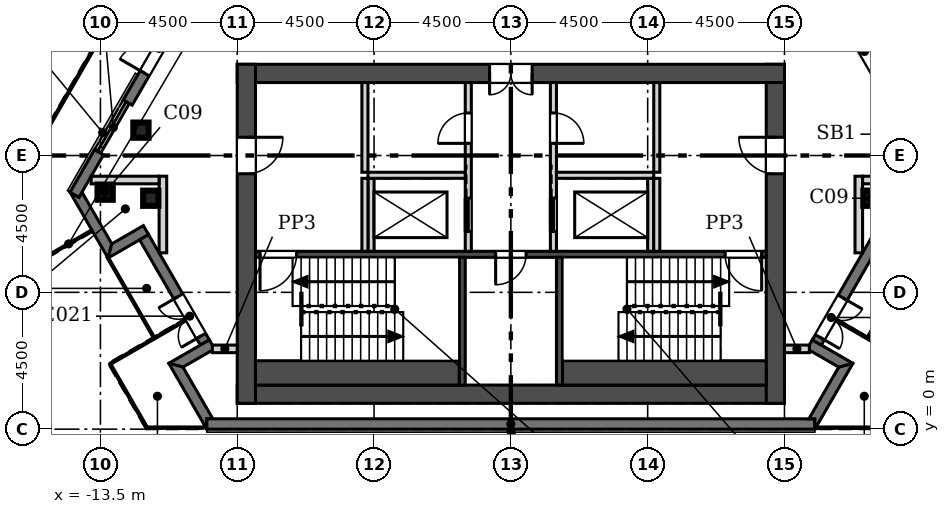
"""IFC4 building model, lengths in metres.
Left out: names, types, materials, properties, quantities, classifications, styles, units other than length and angle.
Written with IfcOpenShell. Run it as: python <this file> out.ifc"""

import sys

from ifc_helpers import new_model, si_unit, direction, frame, frame_2d, origin, origin_2d, place, context, subcontext, project, spatial, polyline, rectangle, hollow_rectangle, outline, extrude, element, fill, save


model = new_model("IFC4")
c1 = context("Model", 3, precision=1e-05, world=origin(), true_north=direction((0.0, 1.0)))
c2 = subcontext(c1, "Body", "Model", "MODEL_VIEW")
j1 = project(units=[si_unit("LENGTHUNIT", "METRE"), si_unit("PLANEANGLEUNIT", "RADIAN")], contexts=[c1])
p1 = place(None, origin())
s1 = spatial("IfcSite", under=j1, at=p1, CompositionType="ELEMENT")
p2 = place(p1, origin())
s2 = spatial("IfcBuilding", under=s1, at=p2, CompositionType="ELEMENT")
p3 = place(p2, frame((0.0, 0.0, 359.6)))
s3 = spatial("IfcBuildingStorey", under=s2, at=p3, CompositionType="ELEMENT", Elevation=359.6)
for number, where, z_axis, x_axis in (
    (1, (-13.345, 7.794, 0.0), (0.0, 0.0, 1.0), (1.0, 0.0, 0.0)),
    (2, (-11.845, 7.595, 0.0), (0.0, 0.0, 1.0), (1.0, 0.0, 0.0)),
    (3, (11.845, 7.595, 0.0), (0.0, 0.0, 1.0), (1.0, 0.0, 0.0)),
    (4, (-12.167, 9.834, 0.0), (0.0, 0.0, 1.0), (1.0, 0.0, 0.0)),
):
    element("IfcColumn", number, at=place(p3, frame(where, z_axis=z_axis, x_axis=x_axis)), inside=s3, PredefinedType="COLUMN", context=c2, shape_type="SweptSolid", body=[
        extrude(hollow_rectangle(XDim=0.5, YDim=0.5, WallThickness=0.025, at=origin_2d()), origin(), (0.0, 0.0, 1.0), 3.6),
    ])
p4 = place(p3, frame((-9.0, 1.15, 0.0), z_axis=(0.0, 0.0, 1.0), x_axis=(1.0, 0.0, 0.0)))
e5 = element("IfcWall", 5, at=p4, inside=s3, PredefinedType="SHEAR", context=c2, shape_type="SweptSolid", body=[
    extrude(rectangle(XDim=18.0, YDim=0.6, at=frame_2d((9.0, 0.0))), origin(), (0.0, 0.0, 1.0), 3.6),
])
p5 = place(p3, frame((8.7, 0.85, 0.0), z_axis=(0.0, 0.0, 1.0), x_axis=(0.0, 1.0, 0.0)))
e6 = element("IfcWall", 6, at=p5, inside=s3, PredefinedType="SHEAR", context=c2, shape_type="SweptSolid", body=[
    extrude(rectangle(XDim=11.15, YDim=0.6, at=frame_2d((5.575, 0.0))), origin(), (0.0, 0.0, 1.0), 3.6),
])
p6 = place(p5, frame((7.55, 0.0, 0.0)))
e7 = element("IfcOpeningElement", 7, at=p6, cuts=e6, PredefinedType="OPENING", context=c2, shape_type="SweptSolid", body=[
    extrude(rectangle(XDim=1.2, YDim=2.1, at=frame_2d((0.6, 1.05))), frame((0.0, 0.31, 0.0), z_axis=(0.0, -1.0, 0.0), x_axis=(1.0, 0.0, 0.0)), (0.0, 0.0, 1.0), 0.62),
])
p7 = place(p3, frame((9.0, 11.7, 0.0), z_axis=(0.0, 0.0, 1.0), x_axis=(-1.0, 0.0, 0.0)))
e8 = element("IfcWall", 8, at=p7, inside=s3, PredefinedType="SHEAR", context=c2, shape_type="SweptSolid", body=[
    extrude(rectangle(XDim=18.0, YDim=0.6, at=frame_2d((9.0, 0.0))), origin(), (0.0, 0.0, 1.0), 3.6),
])
p8 = place(p7, frame((8.3, 0.0, 0.0)))
e9 = element("IfcOpeningElement", 9, at=p8, cuts=e8, PredefinedType="OPENING", context=c2, shape_type="SweptSolid", body=[
    extrude(rectangle(XDim=1.4, YDim=2.1, at=frame_2d((0.7, 1.05))), frame((0.0, 0.31, 0.0), z_axis=(0.0, -1.0, 0.0), x_axis=(1.0, 0.0, 0.0)), (0.0, 0.0, 1.0), 0.62),
])
p9 = place(p3, frame((-8.7, 12.0, 0.0), z_axis=(0.0, 0.0, 1.0), x_axis=(0.0, -1.0, 0.0)))
e10 = element("IfcWall", 10, at=p9, inside=s3, PredefinedType="SHEAR", context=c2, shape_type="SweptSolid", body=[
    extrude(rectangle(XDim=11.15, YDim=0.6, at=frame_2d((5.575, 0.0))), origin(), (0.0, 0.0, 1.0), 3.6),
])
p10 = place(p9, frame((2.4, 0.0, 0.0)))
e11 = element("IfcOpeningElement", 11, at=p10, cuts=e10, PredefinedType="OPENING", context=c2, shape_type="SweptSolid", body=[
    extrude(rectangle(XDim=1.2, YDim=2.1, at=frame_2d((0.6, 1.05))), frame((0.0, 0.31, 0.0), z_axis=(0.0, -1.0, 0.0), x_axis=(1.0, 0.0, 0.0)), (0.0, 0.0, 1.0), 0.62),
])
p11 = place(p3, origin())
e12 = element("IfcWall", 12, at=p11, inside=s3, PredefinedType="SOLIDWALL", context=c2, shape_type="SweptSolid", body=[
    extrude(outline(polyline([(-13.25, 5.628), (-14.501, 7.795), (-14.501, 7.795), (-14.206, 7.625), (-14.107, 7.795), (-13.125, 6.094), (-13.25, 5.628), (-13.25, 5.628)])), origin(), (0.0, 0.0, 1.0), 3.6),
])
p12 = place(p3, origin())
e13 = element("IfcWall", 13, at=p12, inside=s3, PredefinedType="SOLIDWALL", context=c2, shape_type="SweptSolid", body=[
    extrude(outline(polyline([(-12.086, 6.694), (-11.916, 6.399), (-12.21, 6.229), (-13.25, 5.628), (-13.251, 5.628), (-13.126, 6.094), (-12.086, 6.694)])), origin(), (0.0, 0.0, 1.0), 3.6),
])
p13 = place(p3, frame((-12.063, 6.314, 0.0), z_axis=(0.0, 0.0, 1.0), x_axis=(0.49999894854, -0.866026010844, 0.0)))
e14 = element("IfcWall", 14, at=p13, inside=s3, PredefinedType="SOLIDWALL", context=c2, shape_type="SweptSolid", body=[
    extrude(rectangle(XDim=4.0, YDim=0.34, at=frame_2d((2.0, 0.0))), origin(), (0.0, 0.0, 1.0), 3.6),
])
p14 = place(p13, frame((2.25, 0.0, 0.0)))
e15 = element("IfcOpeningElement", 15, at=p14, cuts=e14, PredefinedType="OPENING", context=c2, shape_type="SweptSolid", body=[
    extrude(rectangle(XDim=1.5, YDim=2.4, at=frame_2d((0.75, 1.2))), frame((0.0, 0.18, 0.0), z_axis=(0.0, -1.0, 0.0), x_axis=(1.0, 0.0, 0.0)), (0.0, 0.0, 1.0), 0.36),
])
p15 = place(p3, origin())
e16 = element("IfcWall", 16, at=p15, inside=s3, PredefinedType="SOLIDWALL", context=c2, shape_type="SweptSolid", body=[
    extrude(outline(polyline([(-11.251, 2.165), (-10.211, 2.766), (-9.916, 2.936), (-9.746, 2.64), (-10.785, 2.04), (-11.251, 2.165), (-11.251, 2.165)])), origin(), (0.0, 0.0, 1.0), 3.6),
])
p16 = place(p3, origin())
e17 = element("IfcWall", 17, at=p16, inside=s3, PredefinedType="SOLIDWALL", context=c2, shape_type="SweptSolid", body=[
    extrude(outline(polyline([(-9.803, 0.339), (-10.0, 0.339), (-10.0, -0.001), (-10.0, -0.001), (-11.251, 2.166), (-11.251, 2.166), (-10.785, 2.041), (-9.803, 0.339)])), origin(), (0.0, 0.0, 1.0), 3.6),
])
p17 = place(p3, frame((-10.0, 0.17, 0.0), z_axis=(0.0, 0.0, 1.0), x_axis=(1.0, 0.0, 0.0)))
e18 = element("IfcWall", 18, at=p17, inside=s3, PredefinedType="SOLIDWALL", context=c2, shape_type="SweptSolid", body=[
    extrude(rectangle(XDim=20.0, YDim=0.34, at=frame_2d((10.0, 0.0))), origin(), (0.0, 0.0, 1.0), 3.6),
])
p18 = place(p3, origin())
e19 = element("IfcWall", 19, at=p18, inside=s3, PredefinedType="SOLIDWALL", context=c2, shape_type="SweptSolid", body=[
    extrude(outline(polyline([(11.251, 2.166), (10.0, -0.001), (10.0, -0.001), (10.0, 0.339), (9.803, 0.339), (10.785, 2.041), (11.251, 2.166), (11.251, 2.166)])), origin(), (0.0, 0.0, 1.0), 3.6),
])
p19 = place(p3, origin())
e20 = element("IfcWall", 20, at=p19, inside=s3, PredefinedType="SOLIDWALL", context=c2, shape_type="SweptSolid", body=[
    extrude(outline(polyline([(9.746, 2.64), (9.916, 2.936), (10.211, 2.766), (11.251, 2.165), (11.251, 2.165), (10.785, 2.04), (9.746, 2.64)])), origin(), (0.0, 0.0, 1.0), 3.6),
])
p20 = place(p3, frame((10.063, 2.85, 0.0), z_axis=(0.0, 0.0, 1.0), x_axis=(0.49999894854, 0.866026010844, 0.0)))
e21 = element("IfcWall", 21, at=p20, inside=s3, PredefinedType="SOLIDWALL", context=c2, shape_type="SweptSolid", body=[
    extrude(rectangle(XDim=4.0, YDim=0.34, at=frame_2d((2.0, 0.0))), origin(), (0.0, 0.0, 1.0), 3.6),
])
p21 = place(p20, frame((0.2, 0.0, 0.0)))
e22 = element("IfcOpeningElement", 22, at=p21, cuts=e21, PredefinedType="OPENING", context=c2, shape_type="SweptSolid", body=[
    extrude(rectangle(XDim=1.5, YDim=2.4, at=frame_2d((0.75, 1.2))), frame((0.0, 0.18, 0.0), z_axis=(0.0, -1.0, 0.0), x_axis=(1.0, 0.0, 0.0)), (0.0, 0.0, 1.0), 0.36),
])
p22 = place(p3, frame((12.66, 10.641, 0.0), z_axis=(0.0, 0.0, 1.0), x_axis=(-0.500018604663, 0.866014662111, 0.0)))
e23 = element("IfcWall", 23, at=p22, inside=s3, PredefinedType="SOLIDWALL", context=c2, shape_type="SweptSolid", body=[
    extrude(rectangle(XDim=4.115, YDim=0.34, at=frame_2d((2.058, 0.0))), origin(), (0.0, 0.0, 1.0), 3.6),
])
p23 = place(p22, frame((1.115, 0.0, 0.0)))
e24 = element("IfcOpeningElement", 24, at=p23, cuts=e23, PredefinedType="OPENING", context=c2, shape_type="SweptSolid", body=[
    extrude(rectangle(XDim=1.885, YDim=2.6, at=frame_2d((0.942, 1.3))), frame((0.0, 0.18, 0.0), z_axis=(0.0, -1.0, 0.0), x_axis=(1.0, 0.0, 0.0)), (0.0, 0.0, 1.0), 0.36),
])
p24 = place(p3, frame((-10.545, 14.304, 0.0), z_axis=(0.0, 0.0, 1.0), x_axis=(-0.500018604663, -0.866014662111, 0.0)))
e25 = element("IfcWall", 25, at=p24, inside=s3, PredefinedType="SOLIDWALL", context=c2, shape_type="SweptSolid", body=[
    extrude(rectangle(XDim=4.115, YDim=0.34, at=frame_2d((2.058, 0.0))), origin(), (0.0, 0.0, 1.0), 3.6),
])
p25 = place(p24, frame((1.115, 0.0, 0.0)))
e26 = element("IfcOpeningElement", 26, at=p25, cuts=e25, PredefinedType="OPENING", context=c2, shape_type="SweptSolid", body=[
    extrude(rectangle(XDim=1.885, YDim=2.6, at=frame_2d((0.942, 1.3))), frame((0.0, 0.18, 0.0), z_axis=(0.0, -1.0, 0.0), x_axis=(1.0, 0.0, 0.0)), (0.0, 0.0, 1.0), 0.36),
])
p26 = place(p3, frame((-13.545, 9.108, 0.0), z_axis=(0.0, 0.0, 1.0), x_axis=(-0.500040847832, -0.866001818993, 0.0)))
e27 = element("IfcWall", 27, at=p26, inside=s3, PredefinedType="SOLIDWALL", context=c2, shape_type="SweptSolid", body=[
    extrude(rectangle(XDim=1.615, YDim=0.34, at=frame_2d((0.808, 0.0))), origin(), (0.0, 0.0, 1.0), 3.6),
])
p27 = place(p3, frame((-8.4, 5.75, -0.6), z_axis=(0.0, 0.0, 1.0), x_axis=(1.0, 0.0, 0.0)))
e28 = element("IfcWall", 28, at=p27, inside=s3, PredefinedType="SOLIDWALL", context=c2, shape_type="SweptSolid", body=[
    extrude(rectangle(XDim=16.8, YDim=0.2, at=frame_2d((8.4, 0.0))), origin(), (0.0, 0.0, 1.0), 4.2),
])
p28 = place(p27, frame((7.9, 0.0, 0.6)))
e29 = element("IfcOpeningElement", 29, at=p28, cuts=e28, PredefinedType="OPENING", context=c2, shape_type="SweptSolid", body=[
    extrude(rectangle(XDim=1.0, YDim=2.1, at=frame_2d((0.5, 1.05))), frame((0.0, 0.11, 0.0), z_axis=(0.0, -1.0, 0.0), x_axis=(1.0, 0.0, 0.0)), (0.0, 0.0, 1.0), 0.22),
])
p29 = place(p27, frame((0.15, 0.0, 0.6)))
e30 = element("IfcOpeningElement", 30, at=p29, cuts=e28, PredefinedType="OPENING", context=c2, shape_type="SweptSolid", body=[
    extrude(rectangle(XDim=1.2, YDim=2.1, at=frame_2d((0.6, 1.05))), frame((0.0, 0.11, 0.0), z_axis=(0.0, -1.0, 0.0), x_axis=(1.0, 0.0, 0.0)), (0.0, 0.0, 1.0), 0.22),
])
p30 = place(p27, frame((15.45, 0.0, 0.6)))
e31 = element("IfcOpeningElement", 31, at=p30, cuts=e28, PredefinedType="OPENING", context=c2, shape_type="SweptSolid", body=[
    extrude(rectangle(XDim=1.2, YDim=2.1, at=frame_2d((0.6, 1.05))), frame((0.0, 0.11, 0.0), z_axis=(0.0, -1.0, 0.0), x_axis=(1.0, 0.0, 0.0)), (0.0, 0.0, 1.0), 0.22),
])
p31 = place(p3, frame((-1.6, 1.45, -0.6), z_axis=(0.0, 0.0, 1.0), x_axis=(0.0, 1.0, 0.0)))
e32 = element("IfcWall", 32, at=p31, inside=s3, PredefinedType="SOLIDWALL", context=c2, shape_type="SweptSolid", body=[
    extrude(rectangle(XDim=4.2, YDim=0.2, at=frame_2d((2.1, 0.0))), origin(), (0.0, 0.0, 1.0), 4.2),
])
p32 = place(p3, frame((-8.4, 1.85, -0.6), z_axis=(0.0, 0.0, 1.0), x_axis=(1.0, 0.0, 0.0)))
e33 = element("IfcWall", 33, at=p32, inside=s3, PredefinedType="SOLIDWALL", context=c2, shape_type="SweptSolid", body=[
    extrude(rectangle(XDim=6.7, YDim=0.8, at=frame_2d((3.35, 0.0))), origin(), (0.0, 0.0, 1.0), 4.2),
])
p33 = place(p3, frame((1.6, 1.45, -0.6), z_axis=(0.0, 0.0, 1.0), x_axis=(0.0, 1.0, 0.0)))
e34 = element("IfcWall", 34, at=p33, inside=s3, PredefinedType="SOLIDWALL", context=c2, shape_type="SweptSolid", body=[
    extrude(rectangle(XDim=4.2, YDim=0.2, at=frame_2d((2.1, 0.0))), origin(), (0.0, 0.0, 1.0), 4.2),
])
p34 = place(p3, frame((1.7, 1.85, -0.6), z_axis=(0.0, 0.0, 1.0), x_axis=(1.0, 0.0, 0.0)))
e35 = element("IfcWall", 35, at=p34, inside=s3, PredefinedType="SOLIDWALL", context=c2, shape_type="SweptSolid", body=[
    extrude(rectangle(XDim=6.7, YDim=0.8, at=frame_2d((3.35, 0.0))), origin(), (0.0, 0.0, 1.0), 4.2),
])
p35 = place(p3, frame((-1.4, 5.85, 0.0), z_axis=(0.0, 0.0, 1.0), x_axis=(0.0, 1.0, 0.0)))
e36 = element("IfcWall", 36, at=p35, inside=s3, PredefinedType="SOLIDWALL", context=c2, shape_type="SweptSolid", body=[
    extrude(rectangle(XDim=5.55, YDim=0.2, at=frame_2d((2.775, 0.0))), origin(), (0.0, 0.0, 1.0), 3.6),
])
p36 = place(p35, frame((0.65, 0.0, 0.0)))
e37 = element("IfcOpeningElement", 37, at=p36, cuts=e36, PredefinedType="OPENING", context=c2, shape_type="SweptSolid", body=[
    extrude(rectangle(XDim=1.1, YDim=2.1, at=frame_2d((0.55, 1.05))), frame((0.0, 0.11, 0.0), z_axis=(0.0, -1.0, 0.0), x_axis=(1.0, 0.0, 0.0)), (0.0, 0.0, 1.0), 0.22),
])
p37 = place(p35, frame((3.55, 0.0, 0.0)))
e38 = element("IfcOpeningElement", 38, at=p37, cuts=e36, PredefinedType="OPENING", context=c2, shape_type="SweptSolid", body=[
    extrude(rectangle(XDim=1.0, YDim=2.1, at=frame_2d((0.5, 1.05))), frame((0.0, 0.11, 0.0), z_axis=(0.0, -1.0, 0.0), x_axis=(1.0, 0.0, 0.0)), (0.0, 0.0, 1.0), 0.22),
])
p38 = place(p3, frame((1.4, 5.85, 0.0), z_axis=(0.0, 0.0, 1.0), x_axis=(0.0, 1.0, 0.0)))
e39 = element("IfcWall", 39, at=p38, inside=s3, PredefinedType="SOLIDWALL", context=c2, shape_type="SweptSolid", body=[
    extrude(rectangle(XDim=5.55, YDim=0.2, at=frame_2d((2.775, 0.0))), origin(), (0.0, 0.0, 1.0), 3.6),
])
p39 = place(p38, frame((0.65, 0.0, 0.0)))
e40 = element("IfcOpeningElement", 40, at=p39, cuts=e39, PredefinedType="OPENING", context=c2, shape_type="SweptSolid", body=[
    extrude(rectangle(XDim=1.1, YDim=2.1, at=frame_2d((0.55, 1.05))), frame((0.0, 0.11, 0.0), z_axis=(0.0, -1.0, 0.0), x_axis=(1.0, 0.0, 0.0)), (0.0, 0.0, 1.0), 0.22),
])
p40 = place(p38, frame((3.55, 0.0, 0.0)))
e41 = element("IfcOpeningElement", 41, at=p40, cuts=e39, PredefinedType="OPENING", context=c2, shape_type="SweptSolid", body=[
    extrude(rectangle(XDim=1.0, YDim=2.1, at=frame_2d((0.5, 1.05))), frame((0.0, 0.11, 0.0), z_axis=(0.0, -1.0, 0.0), x_axis=(1.0, 0.0, 0.0)), (0.0, 0.0, 1.0), 0.22),
])
for number, where, z_axis, x_axis in (
    (42, (-4.6, 5.85, 0.0), (0.0, 0.0, 1.0), (0.0, 1.0, 0.0)),
    (43, (4.6, 5.85, 0.0), (0.0, 0.0, 1.0), (0.0, 1.0, 0.0)),
):
    element("IfcWall", number, at=place(p3, frame(where, z_axis=z_axis, x_axis=x_axis)), inside=s3, PredefinedType="SOLIDWALL", context=c2, shape_type="SweptSolid", body=[
        extrude(rectangle(XDim=2.4, YDim=0.2, at=frame_2d((1.2, 0.0))), origin(), (0.0, 0.0, 1.0), 3.6),
    ])
for number, where, z_axis, x_axis in (
    (44, (-4.7, 8.35, 0.0), (0.0, 0.0, 1.0), (1.0, 0.0, 0.0)),
    (45, (1.5, 8.35, 0.0), (0.0, 0.0, 1.0), (1.0, 0.0, 0.0)),
):
    element("IfcWall", number, at=place(p3, frame(where, z_axis=z_axis, x_axis=x_axis)), inside=s3, PredefinedType="SOLIDWALL", context=c2, shape_type="SweptSolid", body=[
        extrude(rectangle(XDim=3.2, YDim=0.2, at=frame_2d((1.6, 0.0))), origin(), (0.0, 0.0, 1.0), 3.6),
    ])
for number, where, z_axis, x_axis in (
    (46, (-4.8, 8.45, 0.0), (0.0, 0.0, 1.0), (0.0, 1.0, 0.0)),
    (47, (4.8, 8.45, 0.0), (0.0, 0.0, 1.0), (0.0, 1.0, 0.0)),
):
    element("IfcWall", number, at=place(p3, frame(where, z_axis=z_axis, x_axis=x_axis)), inside=s3, PredefinedType="SOLIDWALL", context=c2, shape_type="SweptSolid", body=[
        extrude(rectangle(XDim=2.95, YDim=0.2, at=frame_2d((1.475, 0.0))), origin(), (0.0, 0.0, 1.0), 3.6),
    ])
for number, where, z_axis, x_axis in (
    (48, (-4.8, 5.85, 0.0), (0.0, 0.0, 1.0), (0.0, 1.0, 0.0)),
    (49, (4.8, 5.85, 0.0), (0.0, 0.0, 1.0), (0.0, 1.0, 0.0)),
):
    element("IfcWall", number, at=place(p3, frame(where, z_axis=z_axis, x_axis=x_axis)), inside=s3, PredefinedType="SOLIDWALL", context=c2, shape_type="SweptSolid", body=[
        extrude(rectangle(XDim=2.4, YDim=0.2, at=frame_2d((1.2, 0.0))), origin(), (0.0, 0.0, 1.0), 3.6),
    ])
for number, where, z_axis, x_axis in (
    (50, (11.445, 5.799, 0.0), (0.0, 0.0, 1.0), (0.0, 1.0, 0.0)),
    (51, (-11.445, 8.319, 0.0), (0.0, 0.0, 1.0), (0.0, -1.0, 0.0)),
):
    element("IfcWall", number, at=place(p3, frame(where, z_axis=z_axis, x_axis=x_axis)), inside=s3, PredefinedType="SOLIDWALL", context=c2, shape_type="SweptSolid", body=[
        extrude(rectangle(XDim=2.52, YDim=0.25, at=frame_2d((1.26, 0.0))), origin(), (0.0, 0.0, 1.0), 3.6),
    ])
for number, where, z_axis, x_axis in (
    (52, (-13.804, 8.194, 0.0), (0.0, 0.0, 1.0), (1.0, 0.0, 0.0)),
    (53, (11.57, 8.194, 0.0), (0.0, 0.0, 1.0), (1.0, 0.0, 0.0)),
):
    element("IfcWall", number, at=place(p3, frame(where, z_axis=z_axis, x_axis=x_axis)), inside=s3, PredefinedType="SOLIDWALL", context=c2, shape_type="SweptSolid", body=[
        extrude(rectangle(XDim=2.235, YDim=0.25, at=frame_2d((1.117, 0.0))), origin(), (0.0, 0.0, 1.0), 3.6),
    ])
for number, where, z_axis, x_axis in (
    (54, (-9.819, 2.641, 0.0), (0.0, 0.0, 1.0), (1.0, 0.0, 0.0)),
    (55, (9.0, 2.641, 0.0), (0.0, 0.0, 1.0), (1.0, 0.0, 0.0)),
):
    element("IfcWall", number, at=place(p3, frame(where, z_axis=z_axis, x_axis=x_axis)), inside=s3, PredefinedType="SOLIDWALL", context=c2, shape_type="SweptSolid", body=[
        extrude(rectangle(XDim=0.819, YDim=0.25, at=frame_2d((0.409, 0.0))), origin(), (0.0, 0.0, 1.0), 3.6),
    ])
p41 = place(p14, frame((1.5, 0.0, 0.0), z_axis=(0.0, 0.0, 1.0), x_axis=(-1.0, 0.0, 0.0)))
e56 = element("IfcDoor", 56, at=p41, inside=s3, OperationType="DOUBLE_DOOR_SINGLE_SWING", PredefinedType="DOOR", context=c2, shape_type="SweptSolid", body=[
    extrude(rectangle(XDim=1.5, YDim=2.4, at=frame_2d((0.75, 1.2))), frame((0.0, 0.025, 0.0), z_axis=(0.0, -1.0, 0.0), x_axis=(1.0, 0.0, 0.0)), (0.0, 0.0, 1.0), 0.05),
])
fill(e15, e56)
p42 = place(p21, frame((1.5, 0.0, 0.0), z_axis=(0.0, 0.0, 1.0), x_axis=(-1.0, 0.0, 0.0)))
e57 = element("IfcDoor", 57, at=p42, inside=s3, OperationType="DOUBLE_DOOR_SINGLE_SWING", PredefinedType="DOOR", context=c2, shape_type="SweptSolid", body=[
    extrude(rectangle(XDim=1.5, YDim=2.4, at=frame_2d((0.75, 1.2))), frame((0.0, 0.025, 0.0), z_axis=(0.0, -1.0, 0.0), x_axis=(1.0, 0.0, 0.0)), (0.0, 0.0, 1.0), 0.05),
])
fill(e22, e57)
p43 = place(p23, frame((1.885, 0.0, 0.0), z_axis=(0.0, 0.0, 1.0), x_axis=(-1.0, 0.0, 0.0)))
e58 = element("IfcDoor", 58, at=p43, inside=s3, OperationType="DOUBLE_DOOR_SINGLE_SWING", PredefinedType="DOOR", context=c2, shape_type="SweptSolid", body=[
    extrude(rectangle(XDim=1.885, YDim=2.6, at=frame_2d((0.942, 1.3))), frame((0.0, 0.025, 0.0), z_axis=(0.0, -1.0, 0.0), x_axis=(1.0, 0.0, 0.0)), (0.0, 0.0, 1.0), 0.05),
])
fill(e24, e58)
p44 = place(p25, frame((1.885, 0.0, 0.0), z_axis=(0.0, 0.0, 1.0), x_axis=(-1.0, 0.0, 0.0)))
e59 = element("IfcDoor", 59, at=p44, inside=s3, OperationType="DOUBLE_DOOR_SINGLE_SWING", PredefinedType="DOOR", context=c2, shape_type="SweptSolid", body=[
    extrude(rectangle(XDim=1.885, YDim=2.6, at=frame_2d((0.942, 1.3))), frame((0.0, 0.025, 0.0), z_axis=(0.0, -1.0, 0.0), x_axis=(1.0, 0.0, 0.0)), (0.0, 0.0, 1.0), 0.05),
])
fill(e26, e59)
p45 = place(p36, origin())
e60 = element("IfcDoor", 60, at=p45, inside=s3, OperationType="SLIDING_TO_RIGHT", PredefinedType="DOOR", context=c2, shape_type="SweptSolid", body=[
    extrude(rectangle(XDim=1.1, YDim=2.1, at=frame_2d((0.55, 1.05))), frame((0.0, 0.025, 0.0), z_axis=(0.0, -1.0, 0.0), x_axis=(1.0, 0.0, 0.0)), (0.0, 0.0, 1.0), 0.05),
])
fill(e37, e60)
p46 = place(p39, origin())
e61 = element("IfcDoor", 61, at=p46, inside=s3, OperationType="SLIDING_TO_RIGHT", PredefinedType="DOOR", context=c2, shape_type="SweptSolid", body=[
    extrude(rectangle(XDim=1.1, YDim=2.1, at=frame_2d((0.55, 1.05))), frame((0.0, 0.025, 0.0), z_axis=(0.0, -1.0, 0.0), x_axis=(1.0, 0.0, 0.0)), (0.0, 0.0, 1.0), 0.05),
])
fill(e40, e61)
p47 = place(p28, frame((1.0, 0.0, 0.0), z_axis=(0.0, 0.0, 1.0), x_axis=(-1.0, 0.0, 0.0)))
e62 = element("IfcDoor", 62, at=p47, inside=s3, OperationType="SINGLE_SWING_RIGHT", PredefinedType="DOOR", context=c2, shape_type="SweptSolid", body=[
    extrude(rectangle(XDim=1.0, YDim=2.1, at=frame_2d((0.5, 1.05))), frame((0.0, 0.025, 0.0), z_axis=(0.0, -1.0, 0.0), x_axis=(1.0, 0.0, 0.0)), (0.0, 0.0, 1.0), 0.05),
])
fill(e29, e62)
p48 = place(p10, origin())
e63 = element("IfcDoor", 63, at=p48, inside=s3, OperationType="SINGLE_SWING_LEFT", PredefinedType="DOOR", context=c2, shape_type="SweptSolid", body=[
    extrude(rectangle(XDim=1.2, YDim=2.1, at=frame_2d((0.6, 1.05))), frame((0.0, 0.025, 0.0), z_axis=(0.0, -1.0, 0.0), x_axis=(1.0, 0.0, 0.0)), (0.0, 0.0, 1.0), 0.05),
])
fill(e11, e63)
p49 = place(p29, frame((1.2, 0.0, 0.0), z_axis=(0.0, 0.0, 1.0), x_axis=(-1.0, 0.0, 0.0)))
e64 = element("IfcDoor", 64, at=p49, inside=s3, OperationType="SINGLE_SWING_RIGHT", PredefinedType="DOOR", context=c2, shape_type="SweptSolid", body=[
    extrude(rectangle(XDim=1.2, YDim=2.1, at=frame_2d((0.6, 1.05))), frame((0.0, 0.025, 0.0), z_axis=(0.0, -1.0, 0.0), x_axis=(1.0, 0.0, 0.0)), (0.0, 0.0, 1.0), 0.05),
])
fill(e30, e64)
p50 = place(p37, origin())
e65 = element("IfcDoor", 65, at=p50, inside=s3, OperationType="SINGLE_SWING_LEFT", PredefinedType="DOOR", context=c2, shape_type="SweptSolid", body=[
    extrude(rectangle(XDim=1.0, YDim=2.1, at=frame_2d((0.5, 1.05))), frame((0.0, 0.025, 0.0), z_axis=(0.0, -1.0, 0.0), x_axis=(1.0, 0.0, 0.0)), (0.0, 0.0, 1.0), 0.05),
])
fill(e38, e65)
p51 = place(p6, origin())
e66 = element("IfcDoor", 66, at=p51, inside=s3, OperationType="SINGLE_SWING_RIGHT", PredefinedType="DOOR", context=c2, shape_type="SweptSolid", body=[
    extrude(rectangle(XDim=1.2, YDim=2.1, at=frame_2d((0.6, 1.05))), frame((0.0, 0.025, 0.0), z_axis=(0.0, -1.0, 0.0), x_axis=(1.0, 0.0, 0.0)), (0.0, 0.0, 1.0), 0.05),
])
fill(e7, e66)
p52 = place(p30, frame((1.2, 0.0, 0.0), z_axis=(0.0, 0.0, 1.0), x_axis=(-1.0, 0.0, 0.0)))
e67 = element("IfcDoor", 67, at=p52, inside=s3, OperationType="SINGLE_SWING_LEFT", PredefinedType="DOOR", context=c2, shape_type="SweptSolid", body=[
    extrude(rectangle(XDim=1.2, YDim=2.1, at=frame_2d((0.6, 1.05))), frame((0.0, 0.025, 0.0), z_axis=(0.0, -1.0, 0.0), x_axis=(1.0, 0.0, 0.0)), (0.0, 0.0, 1.0), 0.05),
])
fill(e31, e67)
p53 = place(p40, frame((1.0, 0.0, 0.0), z_axis=(0.0, 0.0, 1.0), x_axis=(-1.0, 0.0, 0.0)))
e68 = element("IfcDoor", 68, at=p53, inside=s3, OperationType="SINGLE_SWING_RIGHT", PredefinedType="DOOR", context=c2, shape_type="SweptSolid", body=[
    extrude(rectangle(XDim=1.0, YDim=2.1, at=frame_2d((0.5, 1.05))), frame((0.0, 0.025, 0.0), z_axis=(0.0, -1.0, 0.0), x_axis=(1.0, 0.0, 0.0)), (0.0, 0.0, 1.0), 0.05),
])
fill(e41, e68)
p54 = place(p8, origin())
e69 = element("IfcDoor", 69, at=p54, inside=s3, OperationType="DOUBLE_DOOR_SINGLE_SWING", PredefinedType="DOOR", context=c2, shape_type="SweptSolid", body=[
    extrude(rectangle(XDim=1.4, YDim=2.1, at=frame_2d((0.7, 1.05))), frame((0.0, 0.025, 0.0), z_axis=(0.0, -1.0, 0.0), x_axis=(1.0, 0.0, 0.0)), (0.0, 0.0, 1.0), 0.05),
])
fill(e9, e69)
save(model, sys.argv[1])
